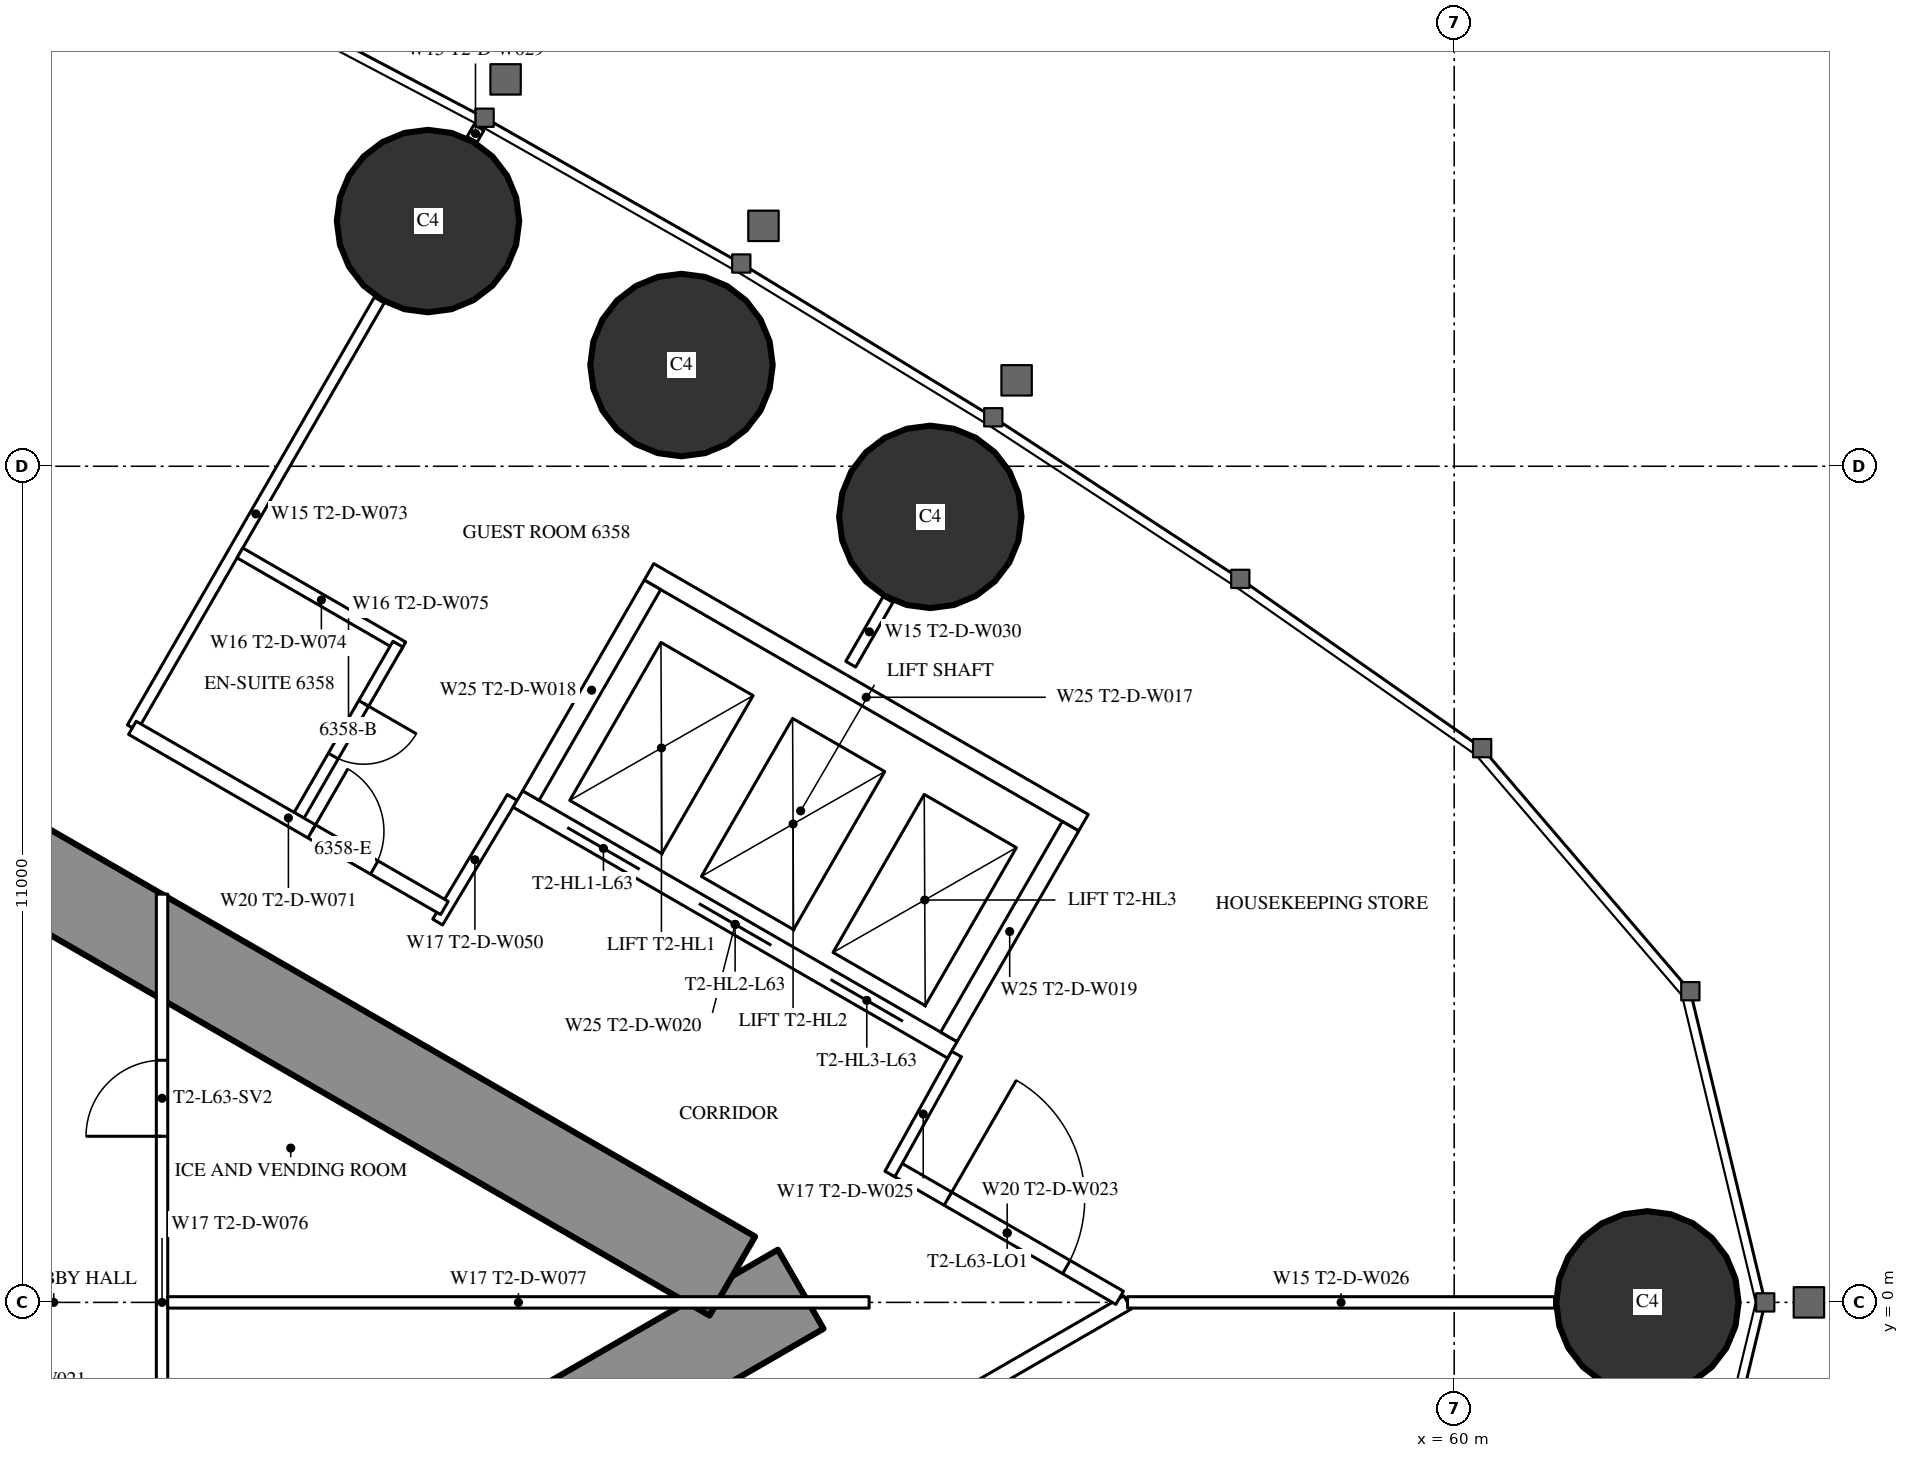
"""IFC4 building model, lengths in metres.
Left out: names, types, materials, properties, quantities, classifications, styles, units other than length and angle.
Written with IfcOpenShell. Run it as: python <this file> out.ifc"""

import sys

from ifc_helpers import new_model, si_unit, direction, frame, frame_2d, origin, origin_2d, place, context, subcontext, project, spatial, rectangle, circle, extrude, element, fill, save


model = new_model("IFC4")
c1 = context("Model", 3, precision=1e-05, world=origin(), true_north=direction((0.0, 1.0)))
c2 = subcontext(c1, "Body", "Model", "MODEL_VIEW")
j1 = project(units=[si_unit("LENGTHUNIT", "METRE"), si_unit("PLANEANGLEUNIT", "RADIAN")], contexts=[c1])
p1 = place(None, origin())
s1 = spatial("IfcSite", under=j1, at=p1, CompositionType="ELEMENT")
p2 = place(p1, origin())
s2 = spatial("IfcBuilding", under=s1, at=p2, CompositionType="ELEMENT")
p3 = place(p2, frame((0.0, 0.0, 236.9)))
s3 = spatial("IfcBuildingStorey", under=s2, at=p3, CompositionType="ELEMENT", Elevation=236.9)
for number, where, z_axis, x_axis in (
    (1, (62.542, 0.0, 0.0), (0.0, 0.0, 1.0), (1.0, 0.0, 0.0)),
    (2, (53.108, 10.334, 0.0), (0.0, 0.0, 1.0), (1.0, 0.0, 0.0)),
    (3, (49.834, 12.332, 0.0), (0.0, 0.0, 1.0), (1.0, 0.0, 0.0)),
    (4, (46.499, 14.226, 0.0), (0.0, 0.0, 1.0), (1.0, 0.0, 0.0)),
):
    element("IfcColumn", number, at=place(p3, frame(where, z_axis=z_axis, x_axis=x_axis)), inside=s3, PredefinedType="COLUMN", context=c2, shape_type="SweptSolid", body=[
        extrude(circle(Radius=1.2, at=origin_2d()), origin(), (0.0, 0.0, 1.0), 3.6),
    ])
p4 = place(p3, frame((27.2, -13.8, 0.0), z_axis=(0.0, 0.0, 1.0), x_axis=(0.866027159892, 0.499996958321, 0.0)))
e5 = element("IfcWall", 5, at=p4, inside=s3, PredefinedType="SHEAR", context=c2, shape_type="SweptSolid", body=[
    extrude(rectangle(XDim=27.947, YDim=1.2, at=frame_2d((13.973, 0.0))), origin(), (0.0, 0.0, 1.0), 3.6),
])
p5 = place(p4, frame((4.6, 0.0, 0.0)))
e6 = element("IfcOpeningElement", 6, at=p5, cuts=e5, PredefinedType="OPENING", context=c2, shape_type="SweptSolid", body=[
    extrude(rectangle(XDim=1.0, YDim=2.2, at=frame_2d((0.5, 1.1))), frame((0.0, 0.61, 0.0), z_axis=(0.0, -1.0, 0.0), x_axis=(1.0, 0.0, 0.0)), (0.0, 0.0, 1.0), 1.22),
])
p6 = place(p4, frame((13.395, 0.0, 0.0)))
e7 = element("IfcOpeningElement", 7, at=p6, cuts=e5, PredefinedType="OPENING", context=c2, shape_type="SweptSolid", body=[
    extrude(rectangle(XDim=1.8, YDim=2.2, at=frame_2d((0.9, 1.1))), frame((0.0, 0.61, 0.0), z_axis=(0.0, -1.0, 0.0), x_axis=(1.0, 0.0, 0.0)), (0.0, 0.0, 1.0), 1.22),
])
p7 = place(p3, frame((27.2, 13.8, 0.0), z_axis=(0.0, 0.0, 1.0), x_axis=(0.866024515034, -0.500001539357, 0.0)))
e8 = element("IfcWall", 8, at=p7, inside=s3, PredefinedType="SHEAR", context=c2, shape_type="SweptSolid", body=[
    extrude(rectangle(XDim=26.907, YDim=1.2, at=frame_2d((13.454, 0.0))), origin(), (0.0, 0.0, 1.0), 3.6),
])
p8 = place(p7, frame((4.6, 0.0, 0.0)))
e9 = element("IfcOpeningElement", 9, at=p8, cuts=e8, PredefinedType="OPENING", context=c2, shape_type="SweptSolid", body=[
    extrude(rectangle(XDim=1.0, YDim=2.2, at=frame_2d((0.5, 1.1))), frame((0.0, 0.61, 0.0), z_axis=(0.0, -1.0, 0.0), x_axis=(1.0, 0.0, 0.0)), (0.0, 0.0, 1.0), 1.22),
])
p9 = place(p7, frame((13.395, 0.0, 0.0)))
e10 = element("IfcOpeningElement", 10, at=p9, cuts=e8, PredefinedType="OPENING", context=c2, shape_type="SweptSolid", body=[
    extrude(rectangle(XDim=1.8, YDim=2.2, at=frame_2d((0.9, 1.1))), frame((0.0, 0.61, 0.0), z_axis=(0.0, -1.0, 0.0), x_axis=(1.0, 0.0, 0.0)), (0.0, 0.0, 1.0), 1.22),
])
p10 = place(p3, frame((28.959, -15.44, 0.0), z_axis=(0.0, 0.0, 1.0), x_axis=(0.866025227435, 0.500000305447, 0.0)))
e11 = element("IfcWall", 11, at=p10, inside=s3, PredefinedType="PARTITIONING", context=c2, shape_type="SweptSolid", body=[
    extrude(rectangle(XDim=30.88, YDim=0.2, at=frame_2d((15.44, 0.0))), origin(), (0.0, 0.0, 1.0), 3.35),
])
p11 = place(p10, frame((1.494, 0.0, 0.0)))
e12 = element("IfcOpeningElement", 12, at=p11, cuts=e11, PredefinedType="OPENING", context=c2, shape_type="SweptSolid", body=[
    extrude(rectangle(XDim=1.8, YDim=2.03, at=frame_2d((0.9, 1.015))), frame((0.0, 0.11, 0.0), z_axis=(0.0, -1.0, 0.0), x_axis=(1.0, 0.0, 0.0)), (0.0, 0.0, 1.0), 0.22),
])
p12 = place(p10, frame((7.687, 0.0, 0.0)))
e13 = element("IfcOpeningElement", 13, at=p12, cuts=e11, PredefinedType="OPENING", context=c2, shape_type="SweptSolid", body=[
    extrude(rectangle(XDim=1.0, YDim=2.2, at=frame_2d((0.5, 1.1))), frame((0.0, 0.11, 0.0), z_axis=(0.0, -1.0, 0.0), x_axis=(1.0, 0.0, 0.0)), (0.0, 0.0, 1.0), 0.22),
])
p13 = place(p10, frame((16.137, 0.0, 0.0)))
e14 = element("IfcOpeningElement", 14, at=p13, cuts=e11, PredefinedType="OPENING", context=c2, shape_type="SweptSolid", body=[
    extrude(rectangle(XDim=0.95, YDim=2.2, at=frame_2d((0.475, 1.1))), frame((0.0, 0.11, 0.0), z_axis=(0.0, -1.0, 0.0), x_axis=(1.0, 0.0, 0.0)), (0.0, 0.0, 1.0), 0.22),
])
p14 = place(p10, frame((20.021, 0.0, 0.0)))
e15 = element("IfcOpeningElement", 15, at=p14, cuts=e11, PredefinedType="OPENING", context=c2, shape_type="SweptSolid", body=[
    extrude(rectangle(XDim=0.95, YDim=2.2, at=frame_2d((0.475, 1.1))), frame((0.0, 0.11, 0.0), z_axis=(0.0, -1.0, 0.0), x_axis=(1.0, 0.0, 0.0)), (0.0, 0.0, 1.0), 0.22),
])
p15 = place(p10, frame((26.253, 0.0, 0.0)))
e16 = element("IfcOpeningElement", 16, at=p15, cuts=e11, PredefinedType="OPENING", context=c2, shape_type="SweptSolid", body=[
    extrude(rectangle(XDim=0.95, YDim=2.2, at=frame_2d((0.475, 1.1))), frame((0.0, 0.11, 0.0), z_axis=(0.0, -1.0, 0.0), x_axis=(1.0, 0.0, 0.0)), (0.0, 0.0, 1.0), 0.22),
])
p16 = place(p3, frame((42.61, 7.559, 0.0), z_axis=(0.0, 0.0, 1.0), x_axis=(0.500014058812, 0.866017286774, 0.0)))
e17 = element("IfcWall", 17, at=p16, inside=s3, PredefinedType="PARTITIONING", context=c2, shape_type="SweptSolid", body=[
    extrude(rectangle(XDim=6.498, YDim=0.15, at=frame_2d((3.249, 0.0))), origin(), (0.0, 0.0, 1.0), 2.45),
])
p17 = place(p3, frame((47.079, 15.3, 0.0), z_axis=(0.0, 0.0, 1.0), x_axis=(0.499212083968, 0.866479829667, 0.0)))
e18 = element("IfcWall", 18, at=p17, inside=s3, PredefinedType="PARTITIONING", context=c2, shape_type="SweptSolid", body=[
    extrude(rectangle(XDim=0.179, YDim=0.15, at=frame_2d((0.09, 0.0))), origin(), (0.0, 0.0, 1.0), 2.45),
])
p18 = place(p3, frame((55.702, 0.0, 0.0), z_axis=(0.0, 0.0, 1.0), x_axis=(1.0, 0.0, 0.0)))
e19 = element("IfcWall", 19, at=p18, inside=s3, PredefinedType="PARTITIONING", context=c2, shape_type="SweptSolid", body=[
    extrude(rectangle(XDim=5.619, YDim=0.15, at=frame_2d((2.81, 0.0))), origin(), (0.0, 0.0, 1.0), 2.45),
])
p19 = place(p3, frame((52.06, 8.396, 0.0), z_axis=(0.0, 0.0, 1.0), x_axis=(0.500095379624, 0.865970329329, 0.0)))
e20 = element("IfcWall", 20, at=p19, inside=s3, PredefinedType="PARTITIONING", context=c2, shape_type="SweptSolid", body=[
    extrude(rectangle(XDim=0.982, YDim=0.15, at=frame_2d((0.491, 0.0))), origin(), (0.0, 0.0, 1.0), 3.35),
])
p20 = place(p3, frame((52.639, 1.769, 0.0), z_axis=(0.0, 0.0, 1.0), x_axis=(0.866027340901, -0.4999966448, 0.0)))
e21 = element("IfcWall", 21, at=p20, inside=s3, PredefinedType="PARTITIONING", context=c2, shape_type="SweptSolid", body=[
    extrude(rectangle(XDim=3.417, YDim=0.2, at=frame_2d((1.708, 0.0))), origin(), (0.0, 0.0, 1.0), 3.35),
])
p21 = place(p20, frame((0.809, 0.0, 0.0)))
e22 = element("IfcOpeningElement", 22, at=p21, cuts=e21, PredefinedType="OPENING", context=c2, shape_type="SweptSolid", body=[
    extrude(rectangle(XDim=1.8, YDim=2.2, at=frame_2d((0.9, 1.1))), frame((0.0, 0.11, 0.0), z_axis=(0.0, -1.0, 0.0), x_axis=(1.0, 0.0, 0.0)), (0.0, 0.0, 1.0), 0.22),
])
p22 = place(p3, frame((47.606, 6.642, 0.0), z_axis=(0.0, 0.0, 1.0), x_axis=(-0.51353662755, -0.858067673418, 0.0)))
e23 = element("IfcWall", 23, at=p22, inside=s3, PredefinedType="PARTITIONING", context=c2, shape_type="SweptSolid", body=[
    extrude(rectangle(XDim=1.91, YDim=0.15, at=frame_2d((0.955, 0.0))), origin(), (0.0, 0.0, 1.0), 3.35),
])
p23 = place(p3, frame((52.576, 1.689, 0.0), z_axis=(0.0, 0.0, 1.0), x_axis=(0.485424724123, 0.874278466629, 0.0)))
e24 = element("IfcWall", 24, at=p23, inside=s3, PredefinedType="PARTITIONING", context=c2, shape_type="SweptSolid", body=[
    extrude(rectangle(XDim=1.805, YDim=0.15, at=frame_2d((0.903, 0.0))), origin(), (0.0, 0.0, 1.0), 3.35),
])
p24 = place(p3, frame((44.025, 9.86, 0.0), z_axis=(0.0, 0.0, 1.0), x_axis=(0.866006523861, -0.500032699561, 0.0)))
e25 = element("IfcWall", 25, at=p24, inside=s3, PredefinedType="PARTITIONING", context=c2, shape_type="SweptSolid", body=[
    extrude(rectangle(XDim=2.475, YDim=0.15, at=frame_2d((1.237, 0.0))), origin(), (0.0, 0.0, 1.0), 3.35),
])
p25 = place(p3, frame((44.803, 6.408, 0.0), z_axis=(0.0, 0.0, 1.0), x_axis=(0.500047596559, 0.865997922154, 0.0)))
e26 = element("IfcWall", 26, at=p25, inside=s3, PredefinedType="PARTITIONING", context=c2, shape_type="SweptSolid", body=[
    extrude(rectangle(XDim=2.6, YDim=0.15, at=frame_2d((1.3, 0.0))), origin(), (0.0, 0.0, 1.0), 3.35),
])
p26 = place(p25, frame((0.9, 0.0, 0.0)))
e27 = element("IfcOpeningElement", 27, at=p26, cuts=e26, PredefinedType="OPENING", context=c2, shape_type="SweptSolid", body=[
    extrude(rectangle(XDim=0.8, YDim=2.2, at=frame_2d((0.4, 1.1))), frame((0.0, 0.085, 0.0), z_axis=(0.0, -1.0, 0.0), x_axis=(1.0, 0.0, 0.0)), (0.0, 0.0, 1.0), 0.17),
])
p27 = place(p3, frame((42.61, 7.559, 0.0), z_axis=(0.0, 0.0, 1.0), x_axis=(0.866032081755, -0.499988433238, 0.0)))
e28 = element("IfcWall", 28, at=p27, inside=s3, PredefinedType="PARTITIONING", context=c2, shape_type="SweptSolid", body=[
    extrude(rectangle(XDim=4.741, YDim=0.2, at=frame_2d((2.37, 0.0))), origin(), (0.0, 0.0, 1.0), 3.35),
])
p28 = place(p27, frame((2.725, 0.0, 0.0)))
e29 = element("IfcOpeningElement", 29, at=p28, cuts=e28, PredefinedType="OPENING", context=c2, shape_type="SweptSolid", body=[
    extrude(rectangle(XDim=0.95, YDim=2.2, at=frame_2d((0.475, 1.1))), frame((0.0, 0.11, 0.0), z_axis=(0.0, -1.0, 0.0), x_axis=(1.0, 0.0, 0.0)), (0.0, 0.0, 1.0), 0.22),
])
p29 = place(p3, frame((43.0, -5.371, 0.0), z_axis=(0.0, 0.0, 1.0), x_axis=(0.0, 1.0, 0.0)))
e30 = element("IfcWall", 30, at=p29, inside=s3, PredefinedType="PARTITIONING", context=c2, shape_type="SweptSolid", body=[
    extrude(rectangle(XDim=10.741, YDim=0.15, at=frame_2d((5.371, 0.0))), origin(), (0.0, 0.0, 1.0), 3.35),
])
p30 = place(p29, frame((2.185, 0.0, 0.0)))
e31 = element("IfcOpeningElement", 31, at=p30, cuts=e30, PredefinedType="OPENING", context=c2, shape_type="SweptSolid", body=[
    extrude(rectangle(XDim=1.0, YDim=2.2, at=frame_2d((0.5, 1.1))), frame((0.0, 0.085, 0.0), z_axis=(0.0, -1.0, 0.0), x_axis=(1.0, 0.0, 0.0)), (0.0, 0.0, 1.0), 0.17),
])
p31 = place(p29, frame((7.556, 0.0, 0.0)))
e32 = element("IfcOpeningElement", 32, at=p31, cuts=e30, PredefinedType="OPENING", context=c2, shape_type="SweptSolid", body=[
    extrude(rectangle(XDim=1.0, YDim=2.2, at=frame_2d((0.5, 1.1))), frame((0.0, 0.085, 0.0), z_axis=(0.0, -1.0, 0.0), x_axis=(1.0, 0.0, 0.0)), (0.0, 0.0, 1.0), 0.17),
])
p32 = place(p3, frame((43.075, 0.0, 0.0), z_axis=(0.0, 0.0, 1.0), x_axis=(1.0, 0.0, 0.0)))
e33 = element("IfcWall", 33, at=p32, inside=s3, PredefinedType="PARTITIONING", context=c2, shape_type="SweptSolid", body=[
    extrude(rectangle(XDim=9.227, YDim=0.15, at=frame_2d((4.614, 0.0))), origin(), (0.0, 0.0, 1.0), 2.45),
])
p33 = place(p3, frame((47.681, 6.622, 0.0), z_axis=(0.0, 0.0, 1.0), x_axis=(0.86603344179, -0.499986077507, 0.0)))
e34 = element("IfcWall", 34, at=p33, inside=s3, PredefinedType="PARTITIONING", context=c2, shape_type="SweptSolid", body=[
    extrude(rectangle(XDim=6.6, YDim=0.25, at=frame_2d((3.3, 0.0))), origin(), (0.0, 0.0, 1.0), 3.35),
])
p34 = place(p33, frame((0.75, 0.0, 0.0)))
e35 = element("IfcOpeningElement", 35, at=p34, cuts=e34, PredefinedType="OPENING", context=c2, shape_type="SweptSolid", body=[
    extrude(rectangle(XDim=1.1, YDim=2.2, at=frame_2d((0.55, 1.1))), frame((0.0, 0.135, 0.0), z_axis=(0.0, -1.0, 0.0), x_axis=(1.0, 0.0, 0.0)), (0.0, 0.0, 1.0), 0.27),
])
p35 = place(p33, frame((2.75, 0.0, 0.0)))
e36 = element("IfcOpeningElement", 36, at=p35, cuts=e34, PredefinedType="OPENING", context=c2, shape_type="SweptSolid", body=[
    extrude(rectangle(XDim=1.1, YDim=2.2, at=frame_2d((0.55, 1.1))), frame((0.0, 0.135, 0.0), z_axis=(0.0, -1.0, 0.0), x_axis=(1.0, 0.0, 0.0)), (0.0, 0.0, 1.0), 0.27),
])
p36 = place(p33, frame((4.75, 0.0, 0.0)))
e37 = element("IfcOpeningElement", 37, at=p36, cuts=e34, PredefinedType="OPENING", context=c2, shape_type="SweptSolid", body=[
    extrude(rectangle(XDim=1.1, YDim=2.2, at=frame_2d((0.55, 1.1))), frame((0.0, 0.135, 0.0), z_axis=(0.0, -1.0, 0.0), x_axis=(1.0, 0.0, 0.0)), (0.0, 0.0, 1.0), 0.27),
])
p37 = place(p3, frame((49.406, 9.611, 0.0), z_axis=(0.0, 0.0, 1.0), x_axis=(0.86603344179, -0.499986077507, 0.0)))
e38 = element("IfcWall", 38, at=p37, inside=s3, PredefinedType="PARTITIONING", context=c2, shape_type="SweptSolid", body=[
    extrude(rectangle(XDim=6.6, YDim=0.25, at=frame_2d((3.3, 0.0))), origin(), (0.0, 0.0, 1.0), 3.35),
])
p38 = place(p3, frame((47.852, 6.668, 0.0), z_axis=(0.0, 0.0, 1.0), x_axis=(0.499929347863, 0.866066190972, 0.0)))
e39 = element("IfcWall", 39, at=p38, inside=s3, PredefinedType="PARTITIONING", context=c2, shape_type="SweptSolid", body=[
    extrude(rectangle(XDim=3.201, YDim=0.25, at=frame_2d((1.6, 0.0))), origin(), (0.0, 0.0, 1.0), 3.35),
])
p39 = place(p3, frame((53.352, 3.493, 0.0), z_axis=(0.0, 0.0, 1.0), x_axis=(0.499872130319, 0.866099216793, 0.0)))
e40 = element("IfcWall", 40, at=p39, inside=s3, PredefinedType="PARTITIONING", context=c2, shape_type="SweptSolid", body=[
    extrude(rectangle(XDim=3.2, YDim=0.25, at=frame_2d((1.6, 0.0))), origin(), (0.0, 0.0, 1.0), 3.35),
])
p40 = place(p26, origin())
e41 = element("IfcDoor", 41, at=p40, inside=s3, OperationType="SINGLE_SWING_RIGHT", PredefinedType="DOOR", context=c2, shape_type="SweptSolid", body=[
    extrude(rectangle(XDim=0.8, YDim=2.2, at=frame_2d((0.4, 1.1))), frame((0.0, 0.025, 0.0), z_axis=(0.0, -1.0, 0.0), x_axis=(1.0, 0.0, 0.0)), (0.0, 0.0, 1.0), 0.05),
])
fill(e27, e41)
p41 = place(p28, origin())
e42 = element("IfcDoor", 42, at=p41, inside=s3, OperationType="SINGLE_SWING_LEFT", PredefinedType="DOOR", context=c2, shape_type="SweptSolid", body=[
    extrude(rectangle(XDim=0.95, YDim=2.2, at=frame_2d((0.475, 1.1))), frame((0.0, 0.025, 0.0), z_axis=(0.0, -1.0, 0.0), x_axis=(1.0, 0.0, 0.0)), (0.0, 0.0, 1.0), 0.05),
])
fill(e29, e42)
p42 = place(p21, origin())
e43 = element("IfcDoor", 43, at=p42, inside=s3, OperationType="DOUBLE_DOOR_SINGLE_SWING", PredefinedType="DOOR", context=c2, shape_type="SweptSolid", body=[
    extrude(rectangle(XDim=1.8, YDim=2.2, at=frame_2d((0.9, 1.1))), frame((0.0, 0.025, 0.0), z_axis=(0.0, -1.0, 0.0), x_axis=(1.0, 0.0, 0.0)), (0.0, 0.0, 1.0), 0.05),
])
fill(e22, e43)
p43 = place(p31, origin())
e44 = element("IfcDoor", 44, at=p43, inside=s3, OperationType="SINGLE_SWING_LEFT", PredefinedType="DOOR", context=c2, shape_type="SweptSolid", body=[
    extrude(rectangle(XDim=1.0, YDim=2.2, at=frame_2d((0.5, 1.1))), frame((0.0, 0.025, 0.0), z_axis=(0.0, -1.0, 0.0), x_axis=(1.0, 0.0, 0.0)), (0.0, 0.0, 1.0), 0.05),
])
fill(e32, e44)
p44 = place(p34, origin())
e45 = element("IfcDoor", 45, at=p44, inside=s3, OperationType="DOUBLE_DOOR_SLIDING", PredefinedType="USERDEFINED", context=c2, shape_type="SweptSolid", body=[
    extrude(rectangle(XDim=1.1, YDim=2.2, at=frame_2d((0.55, 1.1))), frame((0.0, 0.025, 0.0), z_axis=(0.0, -1.0, 0.0), x_axis=(1.0, 0.0, 0.0)), (0.0, 0.0, 1.0), 0.05),
])
fill(e35, e45)
p45 = place(p35, origin())
e46 = element("IfcDoor", 46, at=p45, inside=s3, OperationType="DOUBLE_DOOR_SLIDING", PredefinedType="USERDEFINED", context=c2, shape_type="SweptSolid", body=[
    extrude(rectangle(XDim=1.1, YDim=2.2, at=frame_2d((0.55, 1.1))), frame((0.0, 0.025, 0.0), z_axis=(0.0, -1.0, 0.0), x_axis=(1.0, 0.0, 0.0)), (0.0, 0.0, 1.0), 0.05),
])
fill(e36, e46)
p46 = place(p36, origin())
e47 = element("IfcDoor", 47, at=p46, inside=s3, OperationType="DOUBLE_DOOR_SLIDING", PredefinedType="USERDEFINED", context=c2, shape_type="SweptSolid", body=[
    extrude(rectangle(XDim=1.1, YDim=2.2, at=frame_2d((0.55, 1.1))), frame((0.0, 0.025, 0.0), z_axis=(0.0, -1.0, 0.0), x_axis=(1.0, 0.0, 0.0)), (0.0, 0.0, 1.0), 0.05),
])
fill(e37, e47)
save(model, sys.argv[1])
